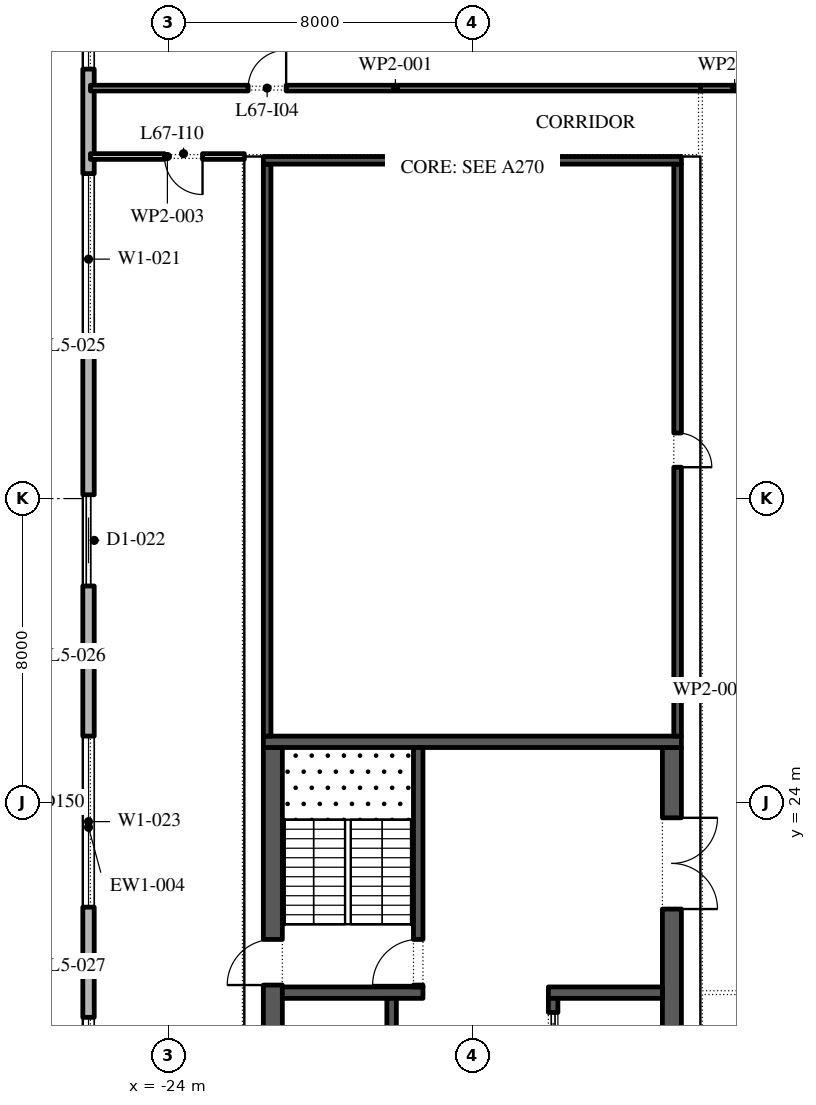
"""IFC4 building model, lengths in metres.
Left out: names, types, materials, properties, quantities, classifications, styles, units other than length and angle.
Written with IfcOpenShell. Run it as: python <this file> out.ifc"""

import sys

from ifc_helpers import new_model, si_unit, direction, frame, frame_2d, origin, place, context, subcontext, project, spatial, rectangle, extrude, element, fill, save


model = new_model("IFC4")
c1 = context("Model", 3, precision=1e-05, world=origin(), true_north=direction((0.0, 1.0)))
c2 = subcontext(c1, "Body", "Model", "MODEL_VIEW")
j1 = project(units=[si_unit("LENGTHUNIT", "METRE"), si_unit("PLANEANGLEUNIT", "RADIAN")], contexts=[c1])
p1 = place(None, origin())
s1 = spatial("IfcSite", under=j1, at=p1, CompositionType="ELEMENT")
p2 = place(p1, origin())
s2 = spatial("IfcBuilding", under=s1, at=p2, CompositionType="ELEMENT")
p3 = place(p2, frame((0.0, 0.0, 309.0)))
s3 = spatial("IfcBuildingStorey", under=s2, at=p3, CompositionType="ELEMENT", Elevation=309.0)
p4 = place(p3, frame((-26.1, 49.1, 0.0), z_axis=(0.0, 0.0, 1.0), x_axis=(0.0, -1.0, 0.0)))
e1 = element("IfcWall", 1, at=p4, inside=s3, PredefinedType="STANDARD", context=c2, shape_type="SweptSolid", body=[
    extrude(rectangle(XDim=51.5, YDim=0.3, at=frame_2d((25.75, 0.0))), origin(), (0.0, 0.0, 1.0), 4.0),
])
p5 = place(p4, frame((1.3, 0.0, 0.45)))
e2 = element("IfcOpeningElement", 2, at=p5, cuts=e1, PredefinedType="OPENING", context=c2, shape_type="SweptSolid", body=[
    extrude(rectangle(XDim=4.5, YDim=3.05, at=frame_2d((2.25, 1.525))), frame((0.0, 0.16, 0.0), z_axis=(0.0, -1.0, 0.0), x_axis=(1.0, 0.0, 0.0)), (0.0, 0.0, 1.0), 0.32),
])
p6 = place(p4, frame((8.55, 0.0, 0.45)))
e3 = element("IfcOpeningElement", 3, at=p6, cuts=e1, PredefinedType="OPENING", context=c2, shape_type="SweptSolid", body=[
    extrude(rectangle(XDim=4.5, YDim=3.05, at=frame_2d((2.25, 1.525))), frame((0.0, 0.16, 0.0), z_axis=(0.0, -1.0, 0.0), x_axis=(1.0, 0.0, 0.0)), (0.0, 0.0, 1.0), 0.32),
])
p7 = place(p4, frame((17.0, 0.0, 0.0)))
e4 = element("IfcOpeningElement", 4, at=p7, cuts=e1, PredefinedType="OPENING", context=c2, shape_type="SweptSolid", body=[
    extrude(rectangle(XDim=2.4, YDim=3.5, at=frame_2d((1.2, 1.75))), frame((0.0, 0.16, 0.0), z_axis=(0.0, -1.0, 0.0), x_axis=(1.0, 0.0, 0.0)), (0.0, 0.0, 1.0), 0.32),
])
p8 = place(p4, frame((23.35, 0.0, 0.45)))
e5 = element("IfcOpeningElement", 5, at=p8, cuts=e1, PredefinedType="OPENING", context=c2, shape_type="SweptSolid", body=[
    extrude(rectangle(XDim=4.5, YDim=3.05, at=frame_2d((2.25, 1.525))), frame((0.0, 0.16, 0.0), z_axis=(0.0, -1.0, 0.0), x_axis=(1.0, 0.0, 0.0)), (0.0, 0.0, 1.0), 0.32),
])
p9 = place(p4, frame((30.75, 0.0, 0.45)))
e6 = element("IfcOpeningElement", 6, at=p9, cuts=e1, PredefinedType="OPENING", context=c2, shape_type="SweptSolid", body=[
    extrude(rectangle(XDim=4.5, YDim=3.05, at=frame_2d((2.25, 1.525))), frame((0.0, 0.16, 0.0), z_axis=(0.0, -1.0, 0.0), x_axis=(1.0, 0.0, 0.0)), (0.0, 0.0, 1.0), 0.32),
])
p10 = place(p4, frame((38.15, 0.0, 0.45)))
e7 = element("IfcOpeningElement", 7, at=p10, cuts=e1, PredefinedType="OPENING", context=c2, shape_type="SweptSolid", body=[
    extrude(rectangle(XDim=4.5, YDim=3.05, at=frame_2d((2.25, 1.525))), frame((0.0, 0.16, 0.0), z_axis=(0.0, -1.0, 0.0), x_axis=(1.0, 0.0, 0.0)), (0.0, 0.0, 1.0), 0.32),
])
p11 = place(p4, frame((46.6, 0.0, 0.0)))
e8 = element("IfcOpeningElement", 8, at=p11, cuts=e1, PredefinedType="OPENING", context=c2, shape_type="SweptSolid", body=[
    extrude(rectangle(XDim=2.4, YDim=3.5, at=frame_2d((1.2, 1.75))), frame((0.0, 0.16, 0.0), z_axis=(0.0, -1.0, 0.0), x_axis=(1.0, 0.0, 0.0)), (0.0, 0.0, 1.0), 0.32),
])
p12 = place(p3, frame((-21.25, -2.45, 0.0), z_axis=(0.0, 0.0, 1.0), x_axis=(0.0, 1.0, 0.0)))
e9 = element("IfcWall", 9, at=p12, inside=s3, PredefinedType="SHEAR", context=c2, shape_type="SweptSolid", body=[
    extrude(rectangle(XDim=27.9, YDim=0.5, at=frame_2d((13.95, 0.0))), origin(), (0.0, 0.0, 1.0), 4.0),
])
p13 = place(p12, frame((5.05, 0.0, 0.0)))
e10 = element("IfcOpeningElement", 10, at=p13, cuts=e9, PredefinedType="OPENING", context=c2, shape_type="SweptSolid", body=[
    extrude(rectangle(XDim=1.2, YDim=2.1, at=frame_2d((0.6, 1.05))), frame((0.0, 0.26, 0.0), z_axis=(0.0, -1.0, 0.0), x_axis=(1.0, 0.0, 0.0)), (0.0, 0.0, 1.0), 0.52),
])
p14 = place(p12, frame((21.65, 0.0, 0.0)))
e11 = element("IfcOpeningElement", 11, at=p14, cuts=e9, PredefinedType="OPENING", context=c2, shape_type="SweptSolid", body=[
    extrude(rectangle(XDim=1.2, YDim=2.1, at=frame_2d((0.6, 1.05))), frame((0.0, 0.26, 0.0), z_axis=(0.0, -1.0, 0.0), x_axis=(1.0, 0.0, 0.0)), (0.0, 0.0, 1.0), 0.52),
])
p15 = place(p3, frame((-10.75, -2.45, 0.0), z_axis=(0.0, 0.0, 1.0), x_axis=(0.0, 1.0, 0.0)))
e12 = element("IfcWall", 12, at=p15, inside=s3, PredefinedType="SHEAR", context=c2, shape_type="SweptSolid", body=[
    extrude(rectangle(XDim=27.9, YDim=0.5, at=frame_2d((13.95, 0.0))), origin(), (0.0, 0.0, 1.0), 4.0),
])
p16 = place(p15, frame((23.65, 0.0, 0.0)))
e13 = element("IfcOpeningElement", 13, at=p16, cuts=e12, PredefinedType="OPENING", context=c2, shape_type="SweptSolid", body=[
    extrude(rectangle(XDim=2.4, YDim=2.1, at=frame_2d((1.2, 1.05))), frame((0.0, 0.26, 0.0), z_axis=(0.0, -1.0, 0.0), x_axis=(1.0, 0.0, 0.0)), (0.0, 0.0, 1.0), 0.52),
])
p17 = place(p15, frame((0.788, 0.0, 0.0)))
e14 = element("IfcOpeningElement", 14, at=p17, cuts=e12, PredefinedType="OPENING", context=c2, shape_type="SweptSolid", body=[
    extrude(rectangle(XDim=0.9, YDim=2.1, at=frame_2d((0.45, 1.05))), frame((0.0, 0.26, 0.0), z_axis=(0.0, -1.0, 0.0), x_axis=(1.0, 0.0, 0.0)), (0.0, 0.0, 1.0), 0.52),
])
p18 = place(p15, frame((3.962, 0.0, 0.0)))
e15 = element("IfcOpeningElement", 15, at=p18, cuts=e12, PredefinedType="OPENING", context=c2, shape_type="SweptSolid", body=[
    extrude(rectangle(XDim=1.0, YDim=2.1, at=frame_2d((0.5, 1.05))), frame((0.0, 0.26, 0.0), z_axis=(0.0, -1.0, 0.0), x_axis=(1.0, 0.0, 0.0)), (0.0, 0.0, 1.0), 0.52),
])
p19 = place(p3, frame((-21.5, 25.6, 0.0), z_axis=(0.0, 0.0, 1.0), x_axis=(1.0, 0.0, 0.0)))
e16 = element("IfcWall", 16, at=p19, inside=s3, PredefinedType="SHEAR", context=c2, shape_type="SweptSolid", body=[
    extrude(rectangle(XDim=11.0, YDim=0.3, at=frame_2d((5.5, 0.0))), origin(), (0.0, 0.0, 1.0), 4.0),
])
p20 = place(p3, frame((-21.0, 19.0, 0.0), z_axis=(0.0, 0.0, 1.0), x_axis=(1.0, 0.0, 0.0)))
e17 = element("IfcWall", 17, at=p20, inside=s3, PredefinedType="SHEAR", context=c2, shape_type="SweptSolid", body=[
    extrude(rectangle(XDim=3.7, YDim=0.3, at=frame_2d((1.85, 0.0))), origin(), (0.0, 0.0, 1.0), 4.0),
])
p21 = place(p3, frame((-17.425, 19.15, 0.0), z_axis=(0.0, 0.0, 1.0), x_axis=(0.0, 1.0, 0.0)))
e18 = element("IfcWall", 18, at=p21, inside=s3, PredefinedType="SHEAR", context=c2, shape_type="SweptSolid", body=[
    extrude(rectangle(XDim=6.3, YDim=0.25, at=frame_2d((3.15, 0.0))), origin(), (0.0, 0.0, 1.0), 4.0),
])
p22 = place(p21, frame((0.05, 0.0, 0.0)))
e19 = element("IfcOpeningElement", 19, at=p22, cuts=e18, PredefinedType="OPENING", context=c2, shape_type="SweptSolid", body=[
    extrude(rectangle(XDim=1.2, YDim=2.1, at=frame_2d((0.6, 1.05))), frame((0.0, 0.135, 0.0), z_axis=(0.0, -1.0, 0.0), x_axis=(1.0, 0.0, 0.0)), (0.0, 0.0, 1.0), 0.27),
])
p23 = place(p3, frame((-18.125, 4.15, 0.0), z_axis=(0.0, 0.0, 1.0), x_axis=(0.0, 1.0, 0.0)))
e20 = element("IfcWall", 20, at=p23, inside=s3, PredefinedType="SHEAR", context=c2, shape_type="SweptSolid", body=[
    extrude(rectangle(XDim=14.7, YDim=0.25, at=frame_2d((7.35, 0.0))), origin(), (0.0, 0.0, 1.0), 4.0),
])
p24 = place(p23, frame((4.296, 0.0, 0.0)))
e21 = element("IfcOpeningElement", 21, at=p24, cuts=e20, PredefinedType="OPENING", context=c2, shape_type="SweptSolid", body=[
    extrude(rectangle(XDim=0.9, YDim=2.1, at=frame_2d((0.45, 1.05))), frame((0.0, 0.135, 0.0), z_axis=(0.0, -1.0, 0.0), x_axis=(1.0, 0.0, 0.0)), (0.0, 0.0, 1.0), 0.27),
])
p25 = place(p23, frame((9.504, 0.0, 0.0)))
e22 = element("IfcOpeningElement", 22, at=p25, cuts=e20, PredefinedType="OPENING", context=c2, shape_type="SweptSolid", body=[
    extrude(rectangle(XDim=0.9, YDim=2.1, at=frame_2d((0.45, 1.05))), frame((0.0, 0.135, 0.0), z_axis=(0.0, -1.0, 0.0), x_axis=(1.0, 0.0, 0.0)), (0.0, 0.0, 1.0), 0.27),
])
p26 = place(p23, frame((0.371, 0.0, 0.0)))
e23 = element("IfcOpeningElement", 23, at=p26, cuts=e20, PredefinedType="OPENING", context=c2, shape_type="SweptSolid", body=[
    extrude(rectangle(XDim=1.1, YDim=2.1, at=frame_2d((0.55, 1.05))), frame((0.0, 0.135, 0.0), z_axis=(0.0, -1.0, 0.0), x_axis=(1.0, 0.0, 0.0)), (0.0, 0.0, 1.0), 0.27),
])
p27 = place(p3, frame((-14.0, 19.0, 0.0), z_axis=(0.0, 0.0, 1.0), x_axis=(1.0, 0.0, 0.0)))
e24 = element("IfcWall", 24, at=p27, inside=s3, PredefinedType="SHEAR", context=c2, shape_type="SweptSolid", body=[
    extrude(rectangle(XDim=3.0, YDim=0.3, at=frame_2d((1.5, 0.0))), origin(), (0.0, 0.0, 1.0), 4.0),
])
p28 = place(p3, frame((-13.875, -2.45, 0.0), z_axis=(0.0, 0.0, 1.0), x_axis=(0.0, 1.0, 0.0)))
e25 = element("IfcWall", 25, at=p28, inside=s3, PredefinedType="SHEAR", context=c2, shape_type="SweptSolid", body=[
    extrude(rectangle(XDim=21.3, YDim=0.25, at=frame_2d((10.65, 0.0))), origin(), (0.0, 0.0, 1.0), 4.0),
])
p29 = place(p28, frame((11.357, 0.0, 0.0)))
e26 = element("IfcOpeningElement", 26, at=p29, cuts=e25, PredefinedType="OPENING", context=c2, shape_type="SweptSolid", body=[
    extrude(rectangle(XDim=0.9, YDim=2.1, at=frame_2d((0.45, 1.05))), frame((0.0, 0.135, 0.0), z_axis=(0.0, -1.0, 0.0), x_axis=(1.0, 0.0, 0.0)), (0.0, 0.0, 1.0), 0.27),
])
p30 = place(p28, frame((6.971, 0.0, 0.0)))
e27 = element("IfcOpeningElement", 27, at=p30, cuts=e25, PredefinedType="OPENING", context=c2, shape_type="SweptSolid", body=[
    extrude(rectangle(XDim=1.1, YDim=2.1, at=frame_2d((0.55, 1.05))), frame((0.0, 0.135, 0.0), z_axis=(0.0, -1.0, 0.0), x_axis=(1.0, 0.0, 0.0)), (0.0, 0.0, 1.0), 0.27),
])
p31 = place(p28, frame((15.543, 0.0, 0.0)))
e28 = element("IfcOpeningElement", 28, at=p31, cuts=e25, PredefinedType="OPENING", context=c2, shape_type="SweptSolid", body=[
    extrude(rectangle(XDim=1.1, YDim=2.1, at=frame_2d((0.55, 1.05))), frame((0.0, 0.135, 0.0), z_axis=(0.0, -1.0, 0.0), x_axis=(1.0, 0.0, 0.0)), (0.0, 0.0, 1.0), 0.27),
])
p32 = place(p28, frame((17.686, 0.0, 0.0)))
e29 = element("IfcOpeningElement", 29, at=p32, cuts=e25, PredefinedType="OPENING", context=c2, shape_type="SweptSolid", body=[
    extrude(rectangle(XDim=1.1, YDim=2.1, at=frame_2d((0.55, 1.05))), frame((0.0, 0.135, 0.0), z_axis=(0.0, -1.0, 0.0), x_axis=(1.0, 0.0, 0.0)), (0.0, 0.0, 1.0), 0.27),
])
p33 = place(p28, frame((19.829, 0.0, 0.0)))
e30 = element("IfcOpeningElement", 30, at=p33, cuts=e25, PredefinedType="OPENING", context=c2, shape_type="SweptSolid", body=[
    extrude(rectangle(XDim=1.1, YDim=2.1, at=frame_2d((0.55, 1.05))), frame((0.0, 0.135, 0.0), z_axis=(0.0, -1.0, 0.0), x_axis=(1.0, 0.0, 0.0)), (0.0, 0.0, 1.0), 0.27),
])
p34 = place(p3, frame((-21.4, 25.75, 0.0), z_axis=(0.0, 0.0, 1.0), x_axis=(0.0, 1.0, 0.0)))
e31 = element("IfcWall", 31, at=p34, inside=s3, PredefinedType="SHEAR", context=c2, shape_type="SweptSolid", body=[
    extrude(rectangle(XDim=15.05, YDim=0.2, at=frame_2d((7.525, 0.0))), origin(), (0.0, 0.0, 1.0), 4.0),
])
p35 = place(p3, frame((-10.6, 25.75, 0.0), z_axis=(0.0, 0.0, 1.0), x_axis=(0.0, 1.0, 0.0)))
e32 = element("IfcWall", 32, at=p35, inside=s3, PredefinedType="SHEAR", context=c2, shape_type="SweptSolid", body=[
    extrude(rectangle(XDim=15.05, YDim=0.2, at=frame_2d((7.525, 0.0))), origin(), (0.0, 0.0, 1.0), 4.0),
])
p36 = place(p35, frame((7.075, 0.0, 0.0)))
e33 = element("IfcOpeningElement", 33, at=p36, cuts=e32, PredefinedType="OPENING", context=c2, shape_type="SweptSolid", body=[
    extrude(rectangle(XDim=0.9, YDim=2.1, at=frame_2d((0.45, 1.05))), frame((0.0, 0.11, 0.0), z_axis=(0.0, -1.0, 0.0), x_axis=(1.0, 0.0, 0.0)), (0.0, 0.0, 1.0), 0.22),
])
p37 = place(p3, frame((-21.5, 40.9, 0.0), z_axis=(0.0, 0.0, 1.0), x_axis=(1.0, 0.0, 0.0)))
e34 = element("IfcWall", 34, at=p37, inside=s3, PredefinedType="SHEAR", context=c2, shape_type="SweptSolid", body=[
    extrude(rectangle(XDim=11.0, YDim=0.2, at=frame_2d((5.5, 0.0))), origin(), (0.0, 0.0, 1.0), 4.0),
])
p38 = place(p3, frame((-26.05, 42.8, 0.0), z_axis=(0.0, 0.0, 1.0), x_axis=(1.0, 0.0, 0.0)))
e35 = element("IfcWall", 35, at=p38, inside=s3, PredefinedType="PARTITIONING", context=c2, shape_type="SweptSolid", body=[
    extrude(rectangle(XDim=16.05, YDim=0.15, at=frame_2d((8.025, 0.0))), origin(), (0.0, 0.0, 1.0), 4.0),
])
p39 = place(p38, frame((4.15, 0.0, 0.0)))
e36 = element("IfcOpeningElement", 36, at=p39, cuts=e35, PredefinedType="OPENING", context=c2, shape_type="SweptSolid", body=[
    extrude(rectangle(XDim=1.0, YDim=2.1, at=frame_2d((0.5, 1.05))), frame((0.0, 0.085, 0.0), z_axis=(0.0, -1.0, 0.0), x_axis=(1.0, 0.0, 0.0)), (0.0, 0.0, 1.0), 0.17),
])
p40 = place(p3, frame((-22.0, 41.0, 0.0), z_axis=(0.0, 0.0, 1.0), x_axis=(-1.0, 0.0, 0.0)))
e37 = element("IfcWall", 37, at=p40, inside=s3, PredefinedType="PARTITIONING", context=c2, shape_type="SweptSolid", body=[
    extrude(rectangle(XDim=4.05, YDim=0.15, at=frame_2d((2.025, 0.0))), origin(), (0.0, 0.0, 1.0), 4.0),
])
p41 = place(p40, frame((1.1, 0.0, 0.0)))
e38 = element("IfcOpeningElement", 38, at=p41, cuts=e37, PredefinedType="OPENING", context=c2, shape_type="SweptSolid", body=[
    extrude(rectangle(XDim=1.0, YDim=2.1, at=frame_2d((0.5, 1.05))), frame((0.0, 0.085, 0.0), z_axis=(0.0, -1.0, 0.0), x_axis=(1.0, 0.0, 0.0)), (0.0, 0.0, 1.0), 0.17),
])
p42 = place(p3, frame((-10.0, 42.8, 0.0), z_axis=(0.0, 0.0, 1.0), x_axis=(1.0, 0.0, 0.0)))
e39 = element("IfcWall", 39, at=p42, inside=s3, PredefinedType="PARTITIONING", context=c2, shape_type="SweptSolid", body=[
    extrude(rectangle(XDim=1.8, YDim=0.15, at=frame_2d((0.9, 0.0))), origin(), (0.0, 0.0, 1.0), 4.0),
])
p43 = place(p5, origin())
e40 = element("IfcWindow", 40, at=p43, inside=s3, PartitioningType="DOUBLE_PANEL_VERTICAL", PredefinedType="WINDOW", context=c2, shape_type="SweptSolid", body=[
    extrude(rectangle(XDim=4.5, YDim=3.05, at=frame_2d((2.25, 1.525))), frame((0.0, 0.03, 0.0), z_axis=(0.0, -1.0, 0.0), x_axis=(1.0, 0.0, 0.0)), (0.0, 0.0, 1.0), 0.06),
])
fill(e2, e40)
p44 = place(p6, origin())
e41 = element("IfcWindow", 41, at=p44, inside=s3, PartitioningType="DOUBLE_PANEL_VERTICAL", PredefinedType="WINDOW", context=c2, shape_type="SweptSolid", body=[
    extrude(rectangle(XDim=4.5, YDim=3.05, at=frame_2d((2.25, 1.525))), frame((0.0, 0.03, 0.0), z_axis=(0.0, -1.0, 0.0), x_axis=(1.0, 0.0, 0.0)), (0.0, 0.0, 1.0), 0.06),
])
fill(e3, e41)
p45 = place(p7, origin())
e42 = element("IfcDoor", 42, at=p45, inside=s3, OperationType="DOUBLE_DOOR_SLIDING", PredefinedType="DOOR", context=c2, shape_type="SweptSolid", body=[
    extrude(rectangle(XDim=2.4, YDim=3.5, at=frame_2d((1.2, 1.75))), frame((0.0, 0.025, 0.0), z_axis=(0.0, -1.0, 0.0), x_axis=(1.0, 0.0, 0.0)), (0.0, 0.0, 1.0), 0.05),
])
fill(e4, e42)
p46 = place(p8, origin())
e43 = element("IfcWindow", 43, at=p46, inside=s3, PartitioningType="DOUBLE_PANEL_VERTICAL", PredefinedType="WINDOW", context=c2, shape_type="SweptSolid", body=[
    extrude(rectangle(XDim=4.5, YDim=3.05, at=frame_2d((2.25, 1.525))), frame((0.0, 0.03, 0.0), z_axis=(0.0, -1.0, 0.0), x_axis=(1.0, 0.0, 0.0)), (0.0, 0.0, 1.0), 0.06),
])
fill(e5, e43)
p47 = place(p9, origin())
e44 = element("IfcWindow", 44, at=p47, inside=s3, PartitioningType="DOUBLE_PANEL_VERTICAL", PredefinedType="WINDOW", context=c2, shape_type="SweptSolid", body=[
    extrude(rectangle(XDim=4.5, YDim=3.05, at=frame_2d((2.25, 1.525))), frame((0.0, 0.03, 0.0), z_axis=(0.0, -1.0, 0.0), x_axis=(1.0, 0.0, 0.0)), (0.0, 0.0, 1.0), 0.06),
])
fill(e6, e44)
p48 = place(p33, origin())
e45 = element("IfcDoor", 45, at=p48, inside=s3, OperationType="SLIDING_TO_LEFT", PredefinedType="DOOR", context=c2, shape_type="SweptSolid", body=[
    extrude(rectangle(XDim=1.1, YDim=2.1, at=frame_2d((0.55, 1.05))), frame((0.0, 0.025, 0.0), z_axis=(0.0, -1.0, 0.0), x_axis=(1.0, 0.0, 0.0)), (0.0, 0.0, 1.0), 0.05),
])
fill(e30, e45)
p49 = place(p16, frame((2.4, 0.0, 0.0), z_axis=(0.0, 0.0, 1.0), x_axis=(-1.0, 0.0, 0.0)))
e46 = element("IfcDoor", 46, at=p49, inside=s3, OperationType="DOUBLE_DOOR_SINGLE_SWING", PredefinedType="DOOR", context=c2, shape_type="SweptSolid", body=[
    extrude(rectangle(XDim=2.4, YDim=2.1, at=frame_2d((1.2, 1.05))), frame((0.0, 0.025, 0.0), z_axis=(0.0, -1.0, 0.0), x_axis=(1.0, 0.0, 0.0)), (0.0, 0.0, 1.0), 0.05),
])
fill(e13, e46)
p50 = place(p22, origin())
e47 = element("IfcDoor", 47, at=p50, inside=s3, OperationType="SINGLE_SWING_RIGHT", PredefinedType="DOOR", context=c2, shape_type="SweptSolid", body=[
    extrude(rectangle(XDim=1.2, YDim=2.1, at=frame_2d((0.6, 1.05))), frame((0.0, 0.025, 0.0), z_axis=(0.0, -1.0, 0.0), x_axis=(1.0, 0.0, 0.0)), (0.0, 0.0, 1.0), 0.05),
])
fill(e19, e47)
p51 = place(p14, origin())
e48 = element("IfcDoor", 48, at=p51, inside=s3, OperationType="SINGLE_SWING_RIGHT", PredefinedType="DOOR", context=c2, shape_type="SweptSolid", body=[
    extrude(rectangle(XDim=1.2, YDim=2.1, at=frame_2d((0.6, 1.05))), frame((0.0, 0.025, 0.0), z_axis=(0.0, -1.0, 0.0), x_axis=(1.0, 0.0, 0.0)), (0.0, 0.0, 1.0), 0.05),
])
fill(e11, e48)
p52 = place(p36, frame((0.9, 0.15, 0.0), z_axis=(0.0, 0.0, 1.0), x_axis=(-1.0, 0.0, 0.0)))
e49 = element("IfcDoor", 49, at=p52, inside=s3, OperationType="SINGLE_SWING_LEFT", PredefinedType="DOOR", context=c2, shape_type="SweptSolid", body=[
    extrude(rectangle(XDim=0.9, YDim=2.1, at=frame_2d((0.45, 1.05))), frame((0.0, 0.1, 0.0), z_axis=(0.0, -1.0, 0.0), x_axis=(1.0, 0.0, 0.0)), (0.0, 0.0, 1.0), 0.05),
])
fill(e33, e49)
p53 = place(p39, origin())
e50 = element("IfcDoor", 50, at=p53, inside=s3, OperationType="SINGLE_SWING_LEFT", PredefinedType="DOOR", context=c2, shape_type="SweptSolid", body=[
    extrude(rectangle(XDim=1.0, YDim=2.1, at=frame_2d((0.5, 1.05))), frame((0.0, 0.025, 0.0), z_axis=(0.0, -1.0, 0.0), x_axis=(1.0, 0.0, 0.0)), (0.0, 0.0, 1.0), 0.05),
])
fill(e36, e50)
p54 = place(p41, origin())
e51 = element("IfcDoor", 51, at=p54, inside=s3, OperationType="SINGLE_SWING_RIGHT", PredefinedType="DOOR", context=c2, shape_type="SweptSolid", body=[
    extrude(rectangle(XDim=1.0, YDim=2.1, at=frame_2d((0.5, 1.05))), frame((0.0, 0.025, 0.0), z_axis=(0.0, -1.0, 0.0), x_axis=(1.0, 0.0, 0.0)), (0.0, 0.0, 1.0), 0.05),
])
fill(e38, e51)
save(model, sys.argv[1])
